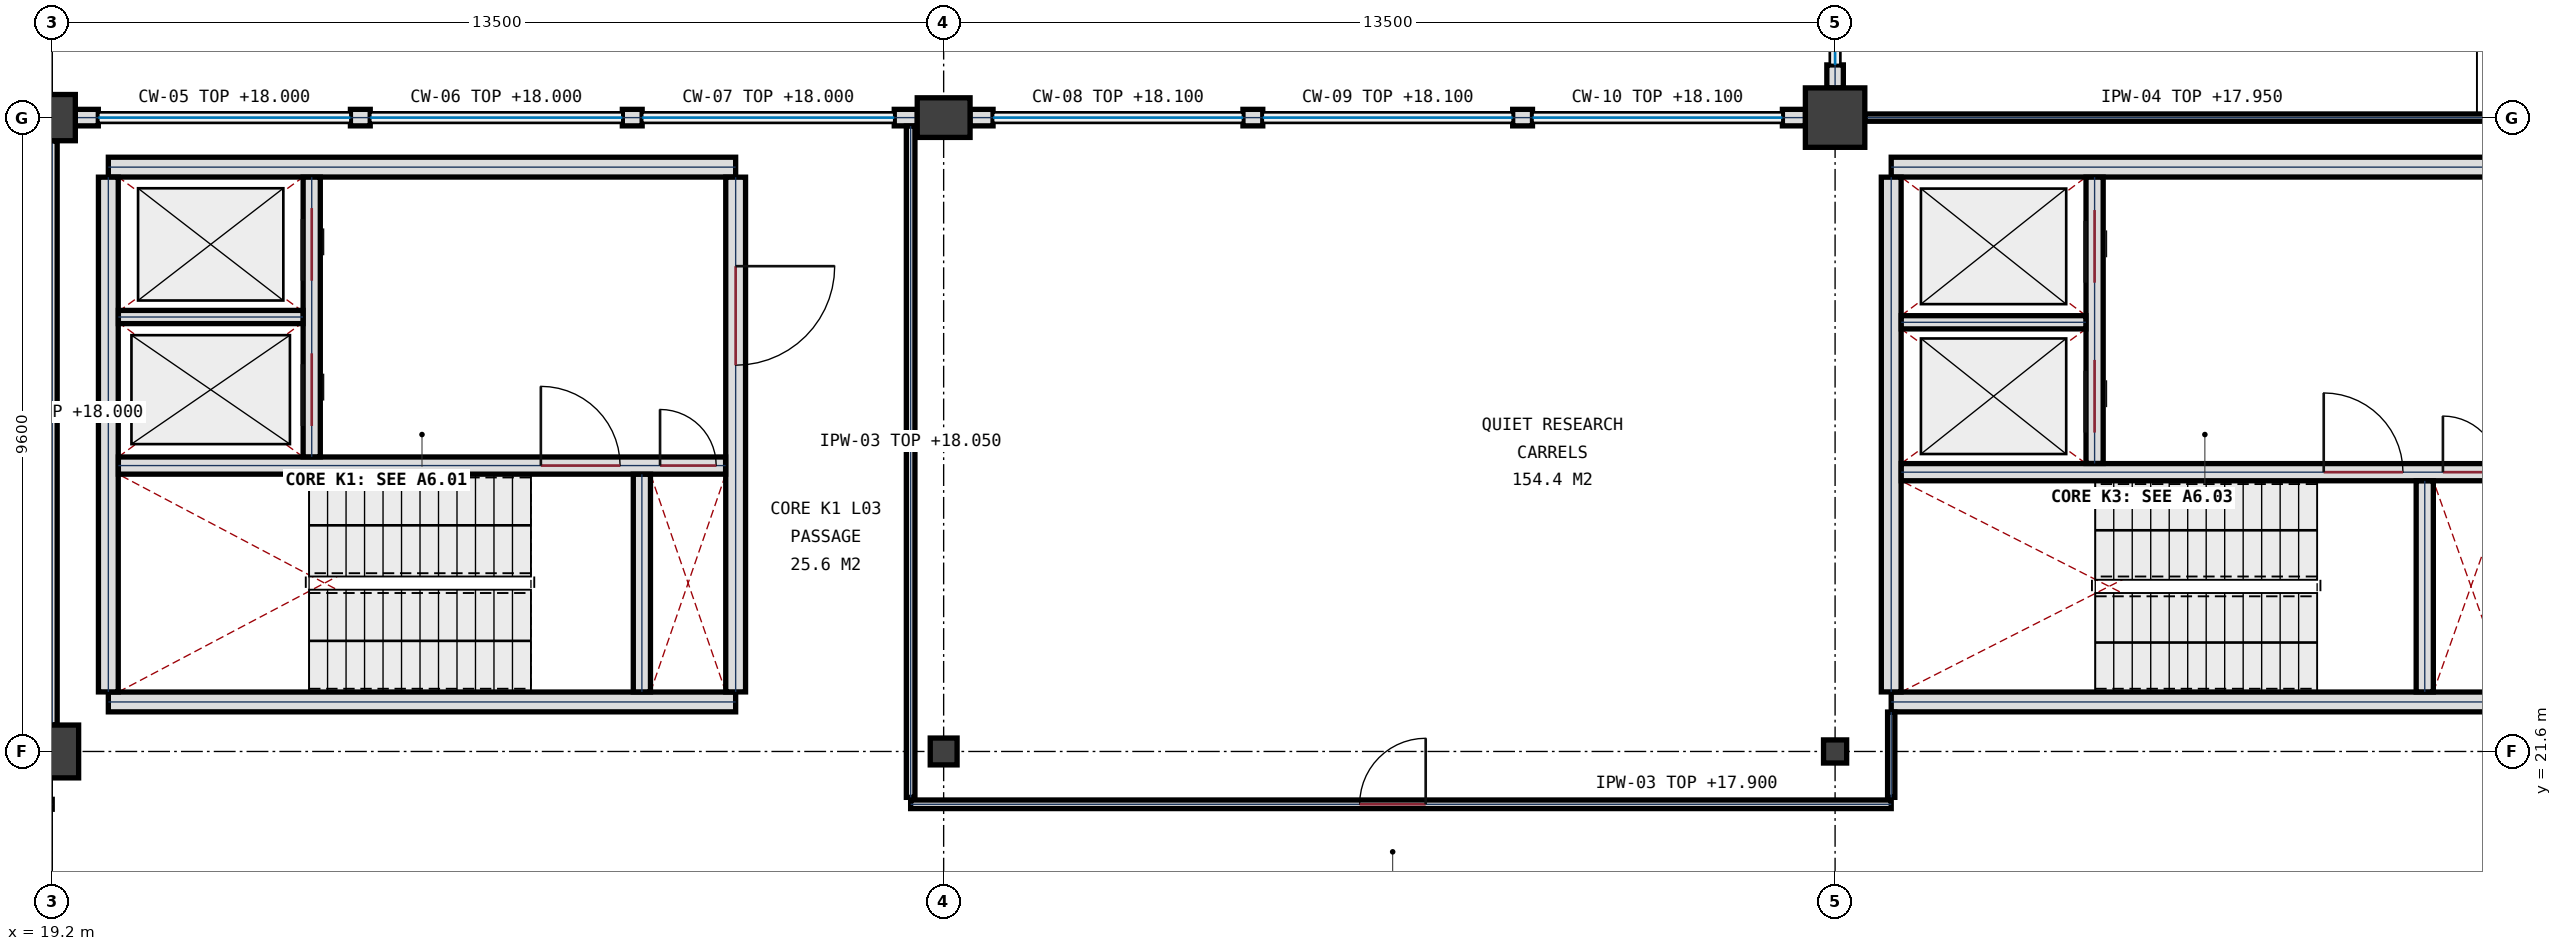
"""IFC4 building model, lengths in metres.
Left out: names, types, materials, properties, quantities, classifications, styles, units other than length and angle.
Written with IfcOpenShell. Run it as: python <this file> out.ifc"""

import sys

from ifc_helpers import new_model, si_unit, direction, frame, frame_2d, origin, origin_2d, place, context, subcontext, project, spatial, rectangle, hollow_rectangle, circle, hollow_circle, extrude, element, fill, save


model = new_model("IFC4")
c1 = context("Model", 3, precision=1e-05, world=origin(), true_north=direction((0.0, 1.0)))
c2 = subcontext(c1, "Body", "Model", "MODEL_VIEW")
j1 = project(units=[si_unit("LENGTHUNIT", "METRE"), si_unit("PLANEANGLEUNIT", "RADIAN")], contexts=[c1])
p1 = place(None, origin())
s1 = spatial("IfcSite", under=j1, at=p1, CompositionType="ELEMENT")
p2 = place(p1, origin())
s2 = spatial("IfcBuilding", under=s1, at=p2, CompositionType="ELEMENT")
p3 = place(p2, frame((0.0, 0.0, 14.4)))
s3 = spatial("IfcBuildingStorey", under=s2, at=p3, CompositionType="ELEMENT", Elevation=14.4)
p4 = place(p3, frame((19.2, 21.6, 0.0), z_axis=(0.0, 0.0, 1.0), x_axis=(1.0, 0.0, 0.0)))
e1 = element("IfcColumn", 1, at=p4, inside=s3, PredefinedType="COLUMN", context=c2, shape_type="SweptSolid", body=[
    extrude(circle(Radius=0.4, at=origin_2d()), origin(), (0.0, 0.0, 1.0), 4.5),
])
p5 = place(p3, frame((19.2, 31.2, 0.0), z_axis=(0.0, 0.0, 1.0), x_axis=(1.0, 0.0, 0.0)))
e2 = element("IfcColumn", 2, at=p5, inside=s3, PredefinedType="COLUMN", context=c2, shape_type="SweptSolid", body=[
    extrude(circle(Radius=0.35, at=origin_2d()), origin(), (0.0, 0.0, 1.0), 4.5),
])
p6 = place(p3, frame((32.7, 21.6, 0.0), z_axis=(0.0, 0.0, 1.0), x_axis=(1.0, 0.0, 0.0)))
e3 = element("IfcColumn", 3, at=p6, inside=s3, PredefinedType="COLUMN", context=c2, shape_type="SweptSolid", body=[
    extrude(hollow_circle(Radius=0.203, WallThickness=0.016, at=origin_2d()), origin(), (0.0, 0.0, 1.0), 4.5),
])
p7 = place(p3, frame((32.7, 31.2, 0.0), z_axis=(0.0, 0.0, 1.0), x_axis=(1.0, 0.0, 0.0)))
e4 = element("IfcColumn", 4, at=p7, inside=s3, PredefinedType="COLUMN", context=c2, shape_type="SweptSolid", body=[
    extrude(rectangle(XDim=0.8, YDim=0.6, at=origin_2d()), origin(), (0.0, 0.0, 1.0), 4.5),
])
p8 = place(p3, frame((46.2, 21.6, 0.0), z_axis=(0.0, 0.0, 1.0), x_axis=(1.0, 0.0, 0.0)))
e5 = element("IfcColumn", 5, at=p8, inside=s3, PredefinedType="COLUMN", context=c2, shape_type="SweptSolid", body=[
    extrude(hollow_rectangle(XDim=0.35, YDim=0.35, WallThickness=0.016, at=origin_2d()), origin(), (0.0, 0.0, 1.0), 4.5),
])
p9 = place(p3, frame((46.2, 31.2, 0.0), z_axis=(0.0, 0.0, 1.0), x_axis=(1.0, 0.0, 0.0)))
e6 = element("IfcColumn", 6, at=p9, inside=s3, PredefinedType="COLUMN", context=c2, shape_type="SweptSolid", body=[
    extrude(circle(Radius=0.45, at=origin_2d()), origin(), (0.0, 0.0, 1.0), 4.5),
])
p10 = place(p3, frame((19.548, 31.2, 0.0), z_axis=(0.0, 0.0, 1.0), x_axis=(1.0, 0.0, 0.0)))
e7 = element("IfcWall", 7, at=p10, inside=s3, PredefinedType="SOLIDWALL", context=c2, shape_type="SweptSolid", body=[
    extrude(rectangle(XDim=0.35, YDim=0.25, at=frame_2d((0.175, 0.0))), origin(), (0.0, 0.0, 1.0), 3.6),
])
p11 = place(p3, frame((31.952, 31.2, 0.0), z_axis=(0.0, 0.0, 1.0), x_axis=(1.0, 0.0, 0.0)))
e8 = element("IfcWall", 8, at=p11, inside=s3, PredefinedType="SOLIDWALL", context=c2, shape_type="SweptSolid", body=[
    extrude(rectangle(XDim=0.35, YDim=0.25, at=frame_2d((0.175, 0.0))), origin(), (0.0, 0.0, 1.0), 3.6),
])
for number, where, z_axis, x_axis in (
    (9, (23.716, 31.2, 0.0), (0.0, 0.0, 1.0), (1.0, 0.0, 0.0)),
    (10, (27.834, 31.2, 0.0), (0.0, 0.0, 1.0), (1.0, 0.0, 0.0)),
):
    element("IfcWall", number, at=place(p3, frame(where, z_axis=z_axis, x_axis=x_axis)), inside=s3, PredefinedType="SOLIDWALL", context=c2, shape_type="SweptSolid", body=[
        extrude(rectangle(XDim=0.3, YDim=0.25, at=frame_2d((0.15, 0.0))), origin(), (0.0, 0.0, 1.0), 3.6),
    ])
p12 = place(p3, frame((33.098, 31.2, 0.0), z_axis=(0.0, 0.0, 1.0), x_axis=(1.0, 0.0, 0.0)))
e11 = element("IfcWall", 11, at=p12, inside=s3, PredefinedType="SOLIDWALL", context=c2, shape_type="SweptSolid", body=[
    extrude(rectangle(XDim=0.35, YDim=0.25, at=frame_2d((0.175, 0.0))), origin(), (0.0, 0.0, 1.0), 3.7),
])
p13 = place(p3, frame((45.402, 31.2, 0.0), z_axis=(0.0, 0.0, 1.0), x_axis=(1.0, 0.0, 0.0)))
e12 = element("IfcWall", 12, at=p13, inside=s3, PredefinedType="SOLIDWALL", context=c2, shape_type="SweptSolid", body=[
    extrude(rectangle(XDim=0.35, YDim=0.25, at=frame_2d((0.175, 0.0))), origin(), (0.0, 0.0, 1.0), 3.7),
])
for number, where, z_axis, x_axis in (
    (13, (37.233, 31.2, 0.0), (0.0, 0.0, 1.0), (1.0, 0.0, 0.0)),
    (14, (41.317, 31.2, 0.0), (0.0, 0.0, 1.0), (1.0, 0.0, 0.0)),
):
    element("IfcWall", number, at=place(p3, frame(where, z_axis=z_axis, x_axis=x_axis)), inside=s3, PredefinedType="SOLIDWALL", context=c2, shape_type="SweptSolid", body=[
        extrude(rectangle(XDim=0.3, YDim=0.25, at=frame_2d((0.15, 0.0))), origin(), (0.0, 0.0, 1.0), 3.7),
    ])
p14 = place(p3, frame((46.2, 31.648, 0.0), z_axis=(0.0, 0.0, 1.0), x_axis=(0.0, 1.0, 0.0)))
e15 = element("IfcWall", 15, at=p14, inside=s3, PredefinedType="SOLIDWALL", context=c2, shape_type="SweptSolid", body=[
    extrude(rectangle(XDim=0.35, YDim=0.25, at=frame_2d((0.175, 0.0))), origin(), (0.0, 0.0, 1.0), 3.82),
])
for number, where, z_axis, x_axis in (
    (16, (29.55, 22.35, 0.0), (0.0, 0.0, 1.0), (-1.0, 0.0, 0.0)),
    (17, (20.05, 30.45, 0.0), (0.0, 0.0, 1.0), (1.0, 0.0, 0.0)),
):
    element("IfcWall", number, at=place(p3, frame(where, z_axis=z_axis, x_axis=x_axis)), inside=s3, PredefinedType="SHEAR", context=c2, shape_type="SweptSolid", body=[
        extrude(rectangle(XDim=9.5, YDim=0.3, at=frame_2d((4.75, 0.0))), origin(), (0.0, 0.0, 1.0), 4.5),
    ])
p15 = place(p3, frame((20.05, 22.502, 0.0), z_axis=(0.0, 0.0, 1.0), x_axis=(0.0, 1.0, 0.0)))
e18 = element("IfcWall", 18, at=p15, inside=s3, PredefinedType="SHEAR", context=c2, shape_type="SweptSolid", body=[
    extrude(rectangle(XDim=7.796, YDim=0.3, at=frame_2d((3.898, 0.0))), origin(), (0.0, 0.0, 1.0), 4.5),
])
p16 = place(p3, frame((29.55, 30.298, 0.0), z_axis=(0.0, 0.0, 1.0), x_axis=(0.0, -1.0, 0.0)))
e19 = element("IfcWall", 19, at=p16, inside=s3, PredefinedType="SHEAR", context=c2, shape_type="SweptSolid", body=[
    extrude(rectangle(XDim=7.796, YDim=0.3, at=frame_2d((3.898, 0.0))), origin(), (0.0, 0.0, 1.0), 4.5),
])
p17 = place(p16, frame((1.348, 0.0, 0.0)))
e20 = element("IfcOpeningElement", 20, at=p17, cuts=e19, PredefinedType="OPENING", context=c2, shape_type="SweptSolid", body=[
    extrude(rectangle(XDim=1.5, YDim=2.25, at=frame_2d((0.75, 1.125))), frame((0.0, 0.16, 0.0), z_axis=(0.0, -1.0, 0.0), x_axis=(1.0, 0.0, 0.0)), (0.0, 0.0, 1.0), 0.32),
])
p18 = place(p3, frame((20.202, 25.93, 0.0), z_axis=(0.0, 0.0, 1.0), x_axis=(1.0, 0.0, 0.0)))
e21 = element("IfcWall", 21, at=p18, inside=s3, PredefinedType="SHEAR", context=c2, shape_type="SweptSolid", body=[
    extrude(rectangle(XDim=9.196, YDim=0.26, at=frame_2d((4.598, 0.0))), origin(), (0.0, 0.0, 1.0), 4.5),
])
p19 = place(p18, frame((6.398, 0.0, 0.0)))
e22 = element("IfcOpeningElement", 22, at=p19, cuts=e21, PredefinedType="OPENING", context=c2, shape_type="SweptSolid", body=[
    extrude(rectangle(XDim=1.2, YDim=2.2, at=frame_2d((0.6, 1.1))), frame((0.0, 0.14, 0.0), z_axis=(0.0, -1.0, 0.0), x_axis=(1.0, 0.0, 0.0)), (0.0, 0.0, 1.0), 0.28),
])
p20 = place(p18, frame((8.203, 0.0, 0.0)))
e23 = element("IfcOpeningElement", 23, at=p20, cuts=e21, PredefinedType="OPENING", context=c2, shape_type="SweptSolid", body=[
    extrude(rectangle(XDim=0.85, YDim=2.05, at=frame_2d((0.425, 1.025))), frame((0.0, 0.14, 0.0), z_axis=(0.0, -1.0, 0.0), x_axis=(1.0, 0.0, 0.0)), (0.0, 0.0, 1.0), 0.28),
])
p21 = place(p3, frame((28.13, 22.502, 0.0), z_axis=(0.0, 0.0, 1.0), x_axis=(0.0, 1.0, 0.0)))
e24 = element("IfcWall", 24, at=p21, inside=s3, PredefinedType="SHEAR", context=c2, shape_type="SweptSolid", body=[
    extrude(rectangle(XDim=3.296, YDim=0.26, at=frame_2d((1.648, 0.0))), origin(), (0.0, 0.0, 1.0), 4.5),
])
p22 = place(p3, frame((23.13, 26.062, 0.0), z_axis=(0.0, 0.0, 1.0), x_axis=(0.0, 1.0, 0.0)))
e25 = element("IfcWall", 25, at=p22, inside=s3, PredefinedType="SHEAR", context=c2, shape_type="SweptSolid", body=[
    extrude(rectangle(XDim=4.236, YDim=0.26, at=frame_2d((2.118, 0.0))), origin(), (0.0, 0.0, 1.0), 4.5),
])
p23 = place(p22, frame((0.468, 0.0, 0.0)))
e26 = element("IfcOpeningElement", 26, at=p23, cuts=e25, PredefinedType="OPENING", context=c2, shape_type="SweptSolid", body=[
    extrude(rectangle(XDim=1.1, YDim=2.15, at=frame_2d((0.55, 1.075))), frame((0.0, 0.14, 0.0), z_axis=(0.0, -1.0, 0.0), x_axis=(1.0, 0.0, 0.0)), (0.0, 0.0, 1.0), 0.28),
])
p24 = place(p22, frame((2.668, 0.0, 0.0)))
e27 = element("IfcOpeningElement", 27, at=p24, cuts=e25, PredefinedType="OPENING", context=c2, shape_type="SweptSolid", body=[
    extrude(rectangle(XDim=1.1, YDim=2.15, at=frame_2d((0.55, 1.075))), frame((0.0, 0.14, 0.0), z_axis=(0.0, -1.0, 0.0), x_axis=(1.0, 0.0, 0.0)), (0.0, 0.0, 1.0), 0.28),
])
p25 = place(p3, frame((20.202, 28.18, 0.0), z_axis=(0.0, 0.0, 1.0), x_axis=(1.0, 0.0, 0.0)))
e28 = element("IfcWall", 28, at=p25, inside=s3, PredefinedType="PLUMBINGWALL", context=c2, shape_type="SweptSolid", body=[
    extrude(rectangle(XDim=2.796, YDim=0.2, at=frame_2d((1.398, 0.0))), origin(), (0.0, 0.0, 1.0), 4.16),
])
for number, where, z_axis, x_axis in (
    (29, (56.55, 22.35, 0.0), (0.0, 0.0, 1.0), (-1.0, 0.0, 0.0)),
    (30, (47.05, 30.45, 0.0), (0.0, 0.0, 1.0), (1.0, 0.0, 0.0)),
):
    element("IfcWall", number, at=place(p3, frame(where, z_axis=z_axis, x_axis=x_axis)), inside=s3, PredefinedType="SHEAR", context=c2, shape_type="SweptSolid", body=[
        extrude(rectangle(XDim=9.5, YDim=0.3, at=frame_2d((4.75, 0.0))), origin(), (0.0, 0.0, 1.0), 4.5),
    ])
p26 = place(p3, frame((47.05, 22.502, 0.0), z_axis=(0.0, 0.0, 1.0), x_axis=(0.0, 1.0, 0.0)))
e31 = element("IfcWall", 31, at=p26, inside=s3, PredefinedType="SHEAR", context=c2, shape_type="SweptSolid", body=[
    extrude(rectangle(XDim=7.796, YDim=0.3, at=frame_2d((3.898, 0.0))), origin(), (0.0, 0.0, 1.0), 4.5),
])
p27 = place(p3, frame((47.202, 25.83, 0.0), z_axis=(0.0, 0.0, 1.0), x_axis=(1.0, 0.0, 0.0)))
e32 = element("IfcWall", 32, at=p27, inside=s3, PredefinedType="SHEAR", context=c2, shape_type="SweptSolid", body=[
    extrude(rectangle(XDim=9.196, YDim=0.26, at=frame_2d((4.598, 0.0))), origin(), (0.0, 0.0, 1.0), 4.5),
])
p28 = place(p27, frame((6.398, 0.0, 0.0)))
e33 = element("IfcOpeningElement", 33, at=p28, cuts=e32, PredefinedType="OPENING", context=c2, shape_type="SweptSolid", body=[
    extrude(rectangle(XDim=1.2, YDim=2.2, at=frame_2d((0.6, 1.1))), frame((0.0, 0.14, 0.0), z_axis=(0.0, -1.0, 0.0), x_axis=(1.0, 0.0, 0.0)), (0.0, 0.0, 1.0), 0.28),
])
p29 = place(p27, frame((8.203, 0.0, 0.0)))
e34 = element("IfcOpeningElement", 34, at=p29, cuts=e32, PredefinedType="OPENING", context=c2, shape_type="SweptSolid", body=[
    extrude(rectangle(XDim=0.85, YDim=2.05, at=frame_2d((0.425, 1.025))), frame((0.0, 0.14, 0.0), z_axis=(0.0, -1.0, 0.0), x_axis=(1.0, 0.0, 0.0)), (0.0, 0.0, 1.0), 0.28),
])
p30 = place(p3, frame((55.13, 22.502, 0.0), z_axis=(0.0, 0.0, 1.0), x_axis=(0.0, 1.0, 0.0)))
e35 = element("IfcWall", 35, at=p30, inside=s3, PredefinedType="SHEAR", context=c2, shape_type="SweptSolid", body=[
    extrude(rectangle(XDim=3.196, YDim=0.26, at=frame_2d((1.598, 0.0))), origin(), (0.0, 0.0, 1.0), 4.5),
])
p31 = place(p3, frame((50.13, 25.962, 0.0), z_axis=(0.0, 0.0, 1.0), x_axis=(0.0, 1.0, 0.0)))
e36 = element("IfcWall", 36, at=p31, inside=s3, PredefinedType="SHEAR", context=c2, shape_type="SweptSolid", body=[
    extrude(rectangle(XDim=4.336, YDim=0.26, at=frame_2d((2.168, 0.0))), origin(), (0.0, 0.0, 1.0), 4.5),
])
p32 = place(p31, frame((0.468, 0.0, 0.0)))
e37 = element("IfcOpeningElement", 37, at=p32, cuts=e36, PredefinedType="OPENING", context=c2, shape_type="SweptSolid", body=[
    extrude(rectangle(XDim=1.1, YDim=2.15, at=frame_2d((0.55, 1.075))), frame((0.0, 0.14, 0.0), z_axis=(0.0, -1.0, 0.0), x_axis=(1.0, 0.0, 0.0)), (0.0, 0.0, 1.0), 0.28),
])
p33 = place(p31, frame((2.738, 0.0, 0.0)))
e38 = element("IfcOpeningElement", 38, at=p33, cuts=e36, PredefinedType="OPENING", context=c2, shape_type="SweptSolid", body=[
    extrude(rectangle(XDim=1.1, YDim=2.15, at=frame_2d((0.55, 1.075))), frame((0.0, 0.14, 0.0), z_axis=(0.0, -1.0, 0.0), x_axis=(1.0, 0.0, 0.0)), (0.0, 0.0, 1.0), 0.28),
])
p34 = place(p3, frame((47.202, 28.1, 0.0), z_axis=(0.0, 0.0, 1.0), x_axis=(1.0, 0.0, 0.0)))
e39 = element("IfcWall", 39, at=p34, inside=s3, PredefinedType="PLUMBINGWALL", context=c2, shape_type="SweptSolid", body=[
    extrude(rectangle(XDim=2.796, YDim=0.2, at=frame_2d((1.398, 0.0))), origin(), (0.0, 0.0, 1.0), 4.16),
])
p35 = place(p3, frame((32.2, 20.8, 0.0), z_axis=(0.0, 0.0, 1.0), x_axis=(1.0, 0.0, 0.0)))
e40 = element("IfcWall", 40, at=p35, inside=s3, PredefinedType="PARTITIONING", context=c2, shape_type="SweptSolid", body=[
    extrude(rectangle(XDim=14.85, YDim=0.13, at=frame_2d((7.425, 0.0))), origin(), (0.0, 0.0, 1.0), 3.5),
])
p36 = place(p35, frame((6.8, 0.0, 0.0)))
e41 = element("IfcOpeningElement", 41, at=p36, cuts=e40, PredefinedType="OPENING", context=c2, shape_type="SweptSolid", body=[
    extrude(rectangle(XDim=1.0, YDim=2.2, at=frame_2d((0.5, 1.1))), frame((0.0, 0.075, 0.0), z_axis=(0.0, -1.0, 0.0), x_axis=(1.0, 0.0, 0.0)), (0.0, 0.0, 1.0), 0.15),
])
p37 = place(p3, frame((46.653, 31.2, 0.0), z_axis=(0.0, 0.0, 1.0), x_axis=(1.0, 0.0, 0.0)))
e42 = element("IfcWall", 42, at=p37, inside=s3, PredefinedType="PARTITIONING", context=c2, shape_type="SweptSolid", body=[
    extrude(rectangle(XDim=9.897, YDim=0.11, at=frame_2d((4.948, 0.0))), origin(), (0.0, 0.0, 1.0), 3.55),
])
p38 = place(p3, frame((19.2, 22.003, 0.0), z_axis=(0.0, 0.0, 1.0), x_axis=(0.0, 1.0, 0.0)))
e43 = element("IfcWall", 43, at=p38, inside=s3, PredefinedType="PARTITIONING", context=c2, shape_type="SweptSolid", body=[
    extrude(rectangle(XDim=8.844, YDim=0.15, at=frame_2d((4.422, 0.0))), origin(), (0.0, 0.0, 1.0), 3.6),
])
p39 = place(p3, frame((32.2, 20.905, 0.0), z_axis=(0.0, 0.0, 1.0), x_axis=(0.0, 1.0, 0.0)))
e44 = element("IfcWall", 44, at=p39, inside=s3, PredefinedType="PARTITIONING", context=c2, shape_type="SweptSolid", body=[
    extrude(rectangle(XDim=10.166, YDim=0.13, at=frame_2d((5.083, 0.0))), origin(), (0.0, 0.0, 1.0), 3.65),
])
p40 = place(p3, frame((47.05, 20.905, 0.0), z_axis=(0.0, 0.0, 1.0), x_axis=(0.0, 1.0, 0.0)))
e45 = element("IfcWall", 45, at=p40, inside=s3, PredefinedType="PARTITIONING", context=c2, shape_type="SweptSolid", body=[
    extrude(rectangle(XDim=1.292, YDim=0.11, at=frame_2d((0.646, 0.0))), origin(), (0.0, 0.0, 1.0), 3.6),
])
p41 = place(p17, origin())
e46 = element("IfcDoor", 46, at=p41, inside=s3, OperationType="SINGLE_SWING_LEFT", PredefinedType="DOOR", context=c2, shape_type="SweptSolid", body=[
    extrude(rectangle(XDim=1.5, YDim=2.25, at=frame_2d((0.75, 1.125))), frame((0.0, 0.032, 0.0), z_axis=(0.0, -1.0, 0.0), x_axis=(1.0, 0.0, 0.0)), (0.0, 0.0, 1.0), 0.065),
])
fill(e20, e46)
p42 = place(p19, origin())
e47 = element("IfcDoor", 47, at=p42, inside=s3, OperationType="SINGLE_SWING_LEFT", PredefinedType="DOOR", context=c2, shape_type="SweptSolid", body=[
    extrude(rectangle(XDim=1.2, YDim=2.2, at=frame_2d((0.6, 1.1))), frame((0.0, 0.032, 0.0), z_axis=(0.0, -1.0, 0.0), x_axis=(1.0, 0.0, 0.0)), (0.0, 0.0, 1.0), 0.065),
])
fill(e22, e47)
p43 = place(p20, origin())
e48 = element("IfcDoor", 48, at=p43, inside=s3, OperationType="SINGLE_SWING_LEFT", PredefinedType="DOOR", context=c2, shape_type="SweptSolid", body=[
    extrude(rectangle(XDim=0.85, YDim=2.05, at=frame_2d((0.425, 1.025))), frame((0.0, 0.032, 0.0), z_axis=(0.0, -1.0, 0.0), x_axis=(1.0, 0.0, 0.0)), (0.0, 0.0, 1.0), 0.065),
])
fill(e23, e48)
p44 = place(p23, origin())
e49 = element("IfcDoor", 49, at=p44, inside=s3, OperationType="SLIDING_TO_LEFT", PredefinedType="DOOR", context=c2, shape_type="SweptSolid", body=[
    extrude(rectangle(XDim=1.1, YDim=2.15, at=frame_2d((0.55, 1.075))), frame((0.0, 0.032, 0.0), z_axis=(0.0, -1.0, 0.0), x_axis=(1.0, 0.0, 0.0)), (0.0, 0.0, 1.0), 0.065),
])
fill(e26, e49)
p45 = place(p24, origin())
e50 = element("IfcDoor", 50, at=p45, inside=s3, OperationType="SLIDING_TO_LEFT", PredefinedType="DOOR", context=c2, shape_type="SweptSolid", body=[
    extrude(rectangle(XDim=1.1, YDim=2.15, at=frame_2d((0.55, 1.075))), frame((0.0, 0.032, 0.0), z_axis=(0.0, -1.0, 0.0), x_axis=(1.0, 0.0, 0.0)), (0.0, 0.0, 1.0), 0.065),
])
fill(e27, e50)
p46 = place(p28, origin())
e51 = element("IfcDoor", 51, at=p46, inside=s3, OperationType="SINGLE_SWING_LEFT", PredefinedType="DOOR", context=c2, shape_type="SweptSolid", body=[
    extrude(rectangle(XDim=1.2, YDim=2.2, at=frame_2d((0.6, 1.1))), frame((0.0, 0.032, 0.0), z_axis=(0.0, -1.0, 0.0), x_axis=(1.0, 0.0, 0.0)), (0.0, 0.0, 1.0), 0.065),
])
fill(e33, e51)
p47 = place(p29, origin())
e52 = element("IfcDoor", 52, at=p47, inside=s3, OperationType="SINGLE_SWING_LEFT", PredefinedType="DOOR", context=c2, shape_type="SweptSolid", body=[
    extrude(rectangle(XDim=0.85, YDim=2.05, at=frame_2d((0.425, 1.025))), frame((0.0, 0.032, 0.0), z_axis=(0.0, -1.0, 0.0), x_axis=(1.0, 0.0, 0.0)), (0.0, 0.0, 1.0), 0.065),
])
fill(e34, e52)
p48 = place(p32, origin())
e53 = element("IfcDoor", 53, at=p48, inside=s3, OperationType="SLIDING_TO_LEFT", PredefinedType="DOOR", context=c2, shape_type="SweptSolid", body=[
    extrude(rectangle(XDim=1.1, YDim=2.15, at=frame_2d((0.55, 1.075))), frame((0.0, 0.032, 0.0), z_axis=(0.0, -1.0, 0.0), x_axis=(1.0, 0.0, 0.0)), (0.0, 0.0, 1.0), 0.065),
])
fill(e37, e53)
p49 = place(p33, origin())
e54 = element("IfcDoor", 54, at=p49, inside=s3, OperationType="SLIDING_TO_LEFT", PredefinedType="DOOR", context=c2, shape_type="SweptSolid", body=[
    extrude(rectangle(XDim=1.1, YDim=2.15, at=frame_2d((0.55, 1.075))), frame((0.0, 0.032, 0.0), z_axis=(0.0, -1.0, 0.0), x_axis=(1.0, 0.0, 0.0)), (0.0, 0.0, 1.0), 0.065),
])
fill(e38, e54)
p50 = place(p36, origin())
e55 = element("IfcDoor", 55, at=p50, inside=s3, OperationType="SINGLE_SWING_RIGHT", PredefinedType="DOOR", context=c2, shape_type="SweptSolid", body=[
    extrude(rectangle(XDim=1.0, YDim=2.2, at=frame_2d((0.5, 1.1))), frame((0.0, 0.032, 0.0), z_axis=(0.0, -1.0, 0.0), x_axis=(1.0, 0.0, 0.0)), (0.0, 0.0, 1.0), 0.065),
])
fill(e41, e55)
save(model, sys.argv[1])
